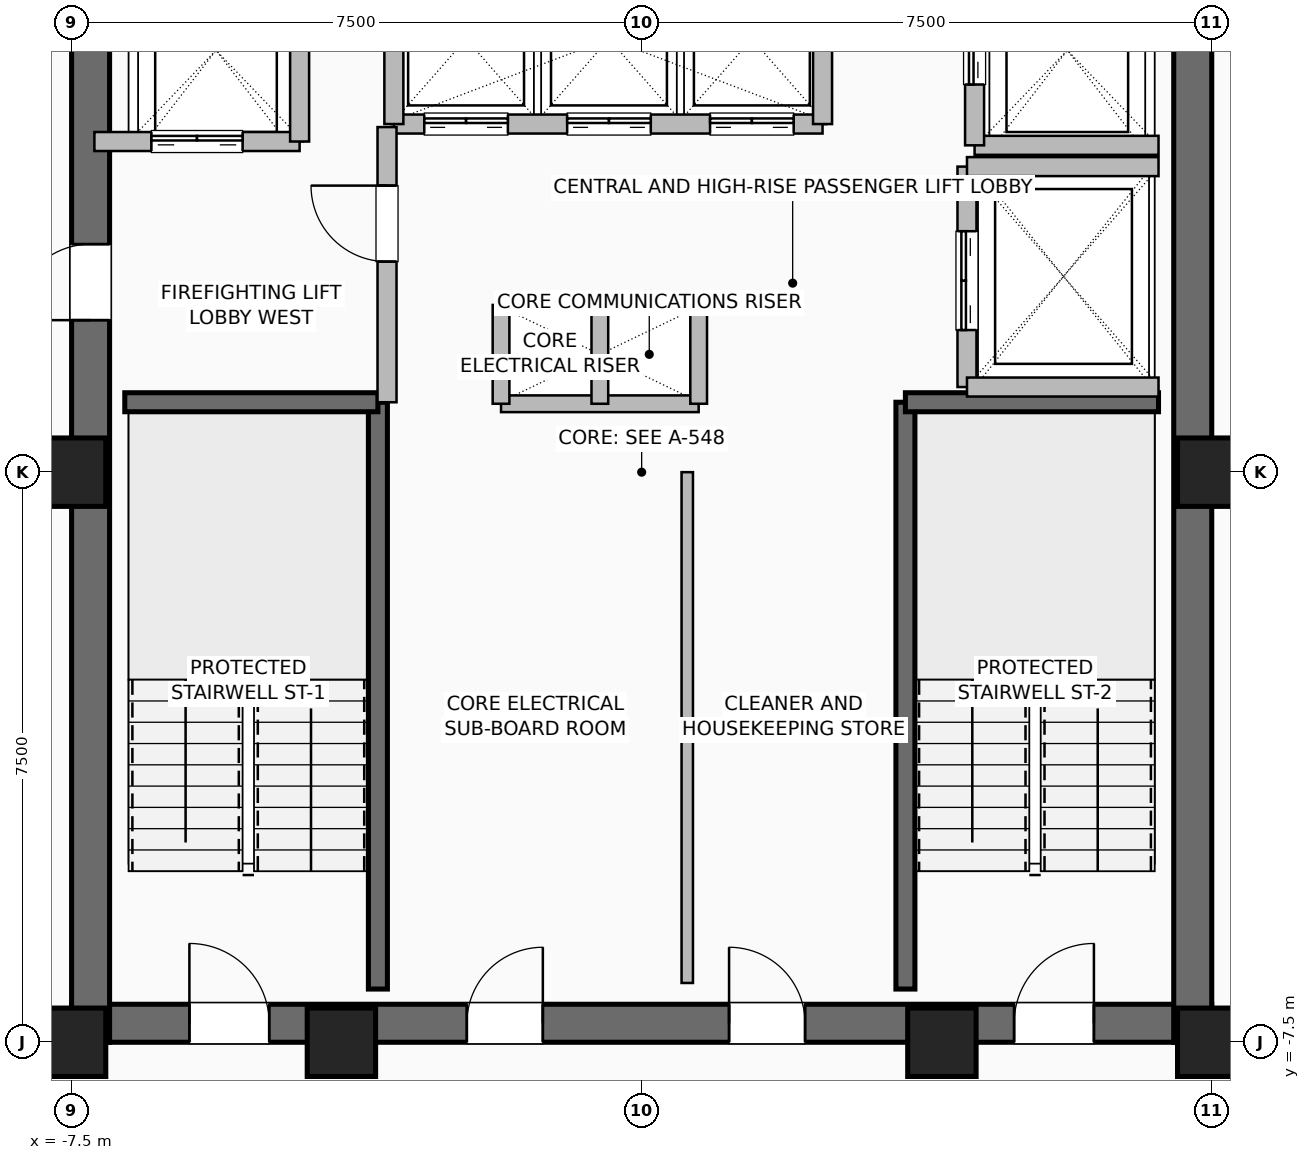
"""IFC4 building model, lengths in metres.
Left out: names, types, materials, properties, quantities, classifications, styles, units other than length and angle.
Written with IfcOpenShell. Run it as: python <this file> out.ifc"""

import sys

from ifc_helpers import new_model, si_unit, direction, frame, frame_2d, origin, origin_2d, place, context, subcontext, project, spatial, rectangle, hollow_rectangle, extrude, element, fill, save


model = new_model("IFC4")
c1 = context("Model", 3, precision=1e-05, world=origin(), true_north=direction((0.0, 1.0)))
c2 = subcontext(c1, "Body", "Model", "MODEL_VIEW")
j1 = project(units=[si_unit("LENGTHUNIT", "METRE"), si_unit("PLANEANGLEUNIT", "RADIAN")], contexts=[c1])
p1 = place(None, origin())
s1 = spatial("IfcSite", under=j1, at=p1, CompositionType="ELEMENT")
p2 = place(p1, origin())
s2 = spatial("IfcBuilding", under=s1, at=p2, CompositionType="ELEMENT")
p3 = place(p2, frame((0.0, 0.0, 187.8)))
s3 = spatial("IfcBuildingStorey", under=s2, at=p3, CompositionType="ELEMENT", Elevation=187.8)
for number, where, z_axis, x_axis in (
    (1, (-7.5, -7.5, 0.0), (0.0, 0.0, 1.0), (1.0, 0.0, 0.0)),
    (2, (-3.95, -7.5, 0.0), (0.0, 0.0, 1.0), (1.0, 0.0, 0.0)),
    (3, (3.95, -7.5, 0.0), (0.0, 0.0, 1.0), (1.0, 0.0, 0.0)),
    (4, (7.5, -7.5, 0.0), (0.0, 0.0, 1.0), (1.0, 0.0, 0.0)),
    (5, (7.5, 0.0, 0.0), (0.0, 0.0, 1.0), (1.0, 0.0, 0.0)),
    (6, (-7.5, 0.0, 0.0), (0.0, 0.0, 1.0), (1.0, 0.0, 0.0)),
):
    element("IfcColumn", number, at=place(p3, frame(where, z_axis=z_axis, x_axis=x_axis)), inside=s3, PredefinedType="COLUMN", context=c2, shape_type="SweptSolid", body=[
        extrude(hollow_rectangle(XDim=0.9, YDim=0.9, WallThickness=0.045, at=origin_2d()), origin(), (0.0, 0.0, 1.0), 3.6),
    ])
p4 = place(p3, frame((-7.5, -7.25, 0.0), z_axis=(0.0, 0.0, 1.0), x_axis=(1.0, 0.0, 0.0)))
e7 = element("IfcWall", 7, at=p4, inside=s3, PredefinedType="SHEAR", context=c2, shape_type="SweptSolid", body=[
    extrude(rectangle(XDim=15.0, YDim=0.5, at=frame_2d((7.5, 0.0))), origin(), (0.0, 0.0, 1.0), 3.36),
])
p5 = place(p4, frame((1.55, 0.0, 0.0)))
e8 = element("IfcOpeningElement", 8, at=p5, cuts=e7, PredefinedType="OPENING", context=c2, shape_type="SweptSolid", body=[
    extrude(rectangle(XDim=1.05, YDim=2.08, at=frame_2d((0.525, 1.04))), frame((0.0, 0.26, 0.0), z_axis=(0.0, -1.0, 0.0), x_axis=(1.0, 0.0, 0.0)), (0.0, 0.0, 1.0), 0.52),
])
p6 = place(p4, frame((12.4, 0.0, 0.0)))
e9 = element("IfcOpeningElement", 9, at=p6, cuts=e7, PredefinedType="OPENING", context=c2, shape_type="SweptSolid", body=[
    extrude(rectangle(XDim=1.05, YDim=2.08, at=frame_2d((0.525, 1.04))), frame((0.0, 0.26, 0.0), z_axis=(0.0, -1.0, 0.0), x_axis=(1.0, 0.0, 0.0)), (0.0, 0.0, 1.0), 0.52),
])
p7 = place(p4, frame((5.2, 0.0, 0.0)))
e10 = element("IfcOpeningElement", 10, at=p7, cuts=e7, PredefinedType="OPENING", context=c2, shape_type="SweptSolid", body=[
    extrude(rectangle(XDim=1.0, YDim=2.08, at=frame_2d((0.5, 1.04))), frame((0.0, 0.26, 0.0), z_axis=(0.0, -1.0, 0.0), x_axis=(1.0, 0.0, 0.0)), (0.0, 0.0, 1.0), 0.52),
])
p8 = place(p4, frame((8.65, 0.0, 0.0)))
e11 = element("IfcOpeningElement", 11, at=p8, cuts=e7, PredefinedType="OPENING", context=c2, shape_type="SweptSolid", body=[
    extrude(rectangle(XDim=1.0, YDim=2.08, at=frame_2d((0.5, 1.04))), frame((0.0, 0.26, 0.0), z_axis=(0.0, -1.0, 0.0), x_axis=(1.0, 0.0, 0.0)), (0.0, 0.0, 1.0), 0.52),
])
p9 = place(p3, frame((-7.25, -7.5, 0.0), z_axis=(0.0, 0.0, 1.0), x_axis=(0.0, 1.0, 0.0)))
e12 = element("IfcWall", 12, at=p9, inside=s3, PredefinedType="SHEAR", context=c2, shape_type="SweptSolid", body=[
    extrude(rectangle(XDim=15.0, YDim=0.5, at=frame_2d((7.5, 0.0))), origin(), (0.0, 0.0, 1.0), 3.36),
])
p10 = place(p9, frame((9.5, 0.0, 0.0)))
e13 = element("IfcOpeningElement", 13, at=p10, cuts=e12, PredefinedType="OPENING", context=c2, shape_type="SweptSolid", body=[
    extrude(rectangle(XDim=1.0, YDim=2.08, at=frame_2d((0.5, 1.04))), frame((0.0, 0.26, 0.0), z_axis=(0.0, -1.0, 0.0), x_axis=(1.0, 0.0, 0.0)), (0.0, 0.0, 1.0), 0.52),
])
p11 = place(p3, frame((7.25, -7.5, 0.0), z_axis=(0.0, 0.0, 1.0), x_axis=(0.0, 1.0, 0.0)))
e14 = element("IfcWall", 14, at=p11, inside=s3, PredefinedType="SHEAR", context=c2, shape_type="SweptSolid", body=[
    extrude(rectangle(XDim=15.0, YDim=0.5, at=frame_2d((7.5, 0.0))), origin(), (0.0, 0.0, 1.0), 3.36),
])
p12 = place(p3, frame((-3.47, -6.8, 0.0), z_axis=(0.0, 0.0, 1.0), x_axis=(0.0, 1.0, 0.0)))
e15 = element("IfcWall", 15, at=p12, inside=s3, PredefinedType="SHEAR", context=c2, shape_type="SweptSolid", body=[
    extrude(rectangle(XDim=7.72, YDim=0.25, at=frame_2d((3.86, 0.0))), origin(), (0.0, 0.0, 1.0), 3.36),
])
p13 = place(p3, frame((-6.8, 0.92, 0.0), z_axis=(0.0, 0.0, 1.0), x_axis=(1.0, 0.0, 0.0)))
e16 = element("IfcWall", 16, at=p13, inside=s3, PredefinedType="SHEAR", context=c2, shape_type="SweptSolid", body=[
    extrude(rectangle(XDim=3.33, YDim=0.25, at=frame_2d((1.665, 0.0))), origin(), (0.0, 0.0, 1.0), 3.36),
])
p14 = place(p3, frame((3.47, -6.8, 0.0), z_axis=(0.0, 0.0, 1.0), x_axis=(0.0, 1.0, 0.0)))
e17 = element("IfcWall", 17, at=p14, inside=s3, PredefinedType="SHEAR", context=c2, shape_type="SweptSolid", body=[
    extrude(rectangle(XDim=7.72, YDim=0.25, at=frame_2d((3.86, 0.0))), origin(), (0.0, 0.0, 1.0), 3.36),
])
p15 = place(p3, frame((3.47, 0.92, 0.0), z_axis=(0.0, 0.0, 1.0), x_axis=(1.0, 0.0, 0.0)))
e18 = element("IfcWall", 18, at=p15, inside=s3, PredefinedType="SHEAR", context=c2, shape_type="SweptSolid", body=[
    extrude(rectangle(XDim=3.33, YDim=0.25, at=frame_2d((1.665, 0.0))), origin(), (0.0, 0.0, 1.0), 3.36),
])
for number, where, z_axis, x_axis in (
    (19, (-1.85, 2.2, 0.0), (0.0, 0.0, 1.0), (1.0, 0.0, 0.0)),
    (20, (-1.85, 0.9, 0.0), (0.0, 0.0, 1.0), (1.0, 0.0, 0.0)),
):
    element("IfcWall", number, at=place(p3, frame(where, z_axis=z_axis, x_axis=x_axis)), inside=s3, PredefinedType="PARTITIONING", context=c2, shape_type="SweptSolid", body=[
        extrude(rectangle(XDim=2.6, YDim=0.22, at=frame_2d((1.3, 0.0))), origin(), (0.0, 0.0, 1.0), 3.36),
    ])
for number, where, z_axis, x_axis in (
    (21, (-0.55, 0.9, 0.0), (0.0, 0.0, 1.0), (0.0, 1.0, 0.0)),
    (22, (0.75, 0.9, 0.0), (0.0, 0.0, 1.0), (0.0, 1.0, 0.0)),
    (23, (-1.85, 0.9, 0.0), (0.0, 0.0, 1.0), (0.0, 1.0, 0.0)),
):
    element("IfcWall", number, at=place(p3, frame(where, z_axis=z_axis, x_axis=x_axis)), inside=s3, PredefinedType="PARTITIONING", context=c2, shape_type="SweptSolid", body=[
        extrude(rectangle(XDim=1.3, YDim=0.22, at=frame_2d((0.65, 0.0))), origin(), (0.0, 0.0, 1.0), 3.36),
    ])
p16 = place(p3, frame((-3.26, 4.58, 0.0), z_axis=(0.0, 0.0, 1.0), x_axis=(1.0, 0.0, 0.0)))
e24 = element("IfcWall", 24, at=p16, inside=s3, PredefinedType="SHEAR", context=c2, shape_type="SweptSolid", body=[
    extrude(rectangle(XDim=5.64, YDim=0.25, at=frame_2d((2.82, 0.0))), origin(), (0.0, 0.0, 1.0), 3.36),
])
p17 = place(p16, frame((0.4, 0.0, 0.0)))
e25 = element("IfcOpeningElement", 25, at=p17, cuts=e24, PredefinedType="OPENING", context=c2, shape_type="SweptSolid", body=[
    extrude(rectangle(XDim=1.1, YDim=2.2, at=frame_2d((0.55, 1.1))), frame((0.0, 0.135, 0.0), z_axis=(0.0, -1.0, 0.0), x_axis=(1.0, 0.0, 0.0)), (0.0, 0.0, 1.0), 0.27),
])
p18 = place(p16, frame((2.28, 0.0, 0.0)))
e26 = element("IfcOpeningElement", 26, at=p18, cuts=e24, PredefinedType="OPENING", context=c2, shape_type="SweptSolid", body=[
    extrude(rectangle(XDim=1.1, YDim=2.2, at=frame_2d((0.55, 1.1))), frame((0.0, 0.135, 0.0), z_axis=(0.0, -1.0, 0.0), x_axis=(1.0, 0.0, 0.0)), (0.0, 0.0, 1.0), 0.27),
])
p19 = place(p16, frame((4.16, 0.0, 0.0)))
e27 = element("IfcOpeningElement", 27, at=p19, cuts=e24, PredefinedType="OPENING", context=c2, shape_type="SweptSolid", body=[
    extrude(rectangle(XDim=1.1, YDim=2.2, at=frame_2d((0.55, 1.1))), frame((0.0, 0.135, 0.0), z_axis=(0.0, -1.0, 0.0), x_axis=(1.0, 0.0, 0.0)), (0.0, 0.0, 1.0), 0.27),
])
for number, where, z_axis, x_axis in (
    (28, (-3.26, 4.58, 0.0), (0.0, 0.0, 1.0), (0.0, 1.0, 0.0)),
    (29, (2.38, 4.58, 0.0), (0.0, 0.0, 1.0), (0.0, 1.0, 0.0)),
):
    element("IfcWall", number, at=place(p3, frame(where, z_axis=z_axis, x_axis=x_axis)), inside=s3, PredefinedType="SHEAR", context=c2, shape_type="SweptSolid", body=[
        extrude(rectangle(XDim=2.22, YDim=0.25, at=frame_2d((1.11, 0.0))), origin(), (0.0, 0.0, 1.0), 3.36),
    ])
p20 = place(p3, frame((-7.2, 4.35, 0.0), z_axis=(0.0, 0.0, 1.0), x_axis=(1.0, 0.0, 0.0)))
e30 = element("IfcWall", 30, at=p20, inside=s3, PredefinedType="SHEAR", context=c2, shape_type="SweptSolid", body=[
    extrude(rectangle(XDim=2.7, YDim=0.25, at=frame_2d((1.35, 0.0))), origin(), (0.0, 0.0, 1.0), 3.36),
])
p21 = place(p20, frame((0.75, 0.0, 0.0)))
e31 = element("IfcOpeningElement", 31, at=p21, cuts=e30, PredefinedType="OPENING", context=c2, shape_type="SweptSolid", body=[
    extrude(rectangle(XDim=1.2, YDim=2.2, at=frame_2d((0.6, 1.1))), frame((0.0, 0.135, 0.0), z_axis=(0.0, -1.0, 0.0), x_axis=(1.0, 0.0, 0.0)), (0.0, 0.0, 1.0), 0.27),
])
p22 = place(p3, frame((-4.5, 4.35, 0.0), z_axis=(0.0, 0.0, 1.0), x_axis=(0.0, 1.0, 0.0)))
e32 = element("IfcWall", 32, at=p22, inside=s3, PredefinedType="SHEAR", context=c2, shape_type="SweptSolid", body=[
    extrude(rectangle(XDim=2.85, YDim=0.25, at=frame_2d((1.425, 0.0))), origin(), (0.0, 0.0, 1.0), 3.36),
])
p23 = place(p3, frame((4.38, 4.3, 0.0), z_axis=(0.0, 0.0, 1.0), x_axis=(1.0, 0.0, 0.0)))
e33 = element("IfcWall", 33, at=p23, inside=s3, PredefinedType="SHEAR", context=c2, shape_type="SweptSolid", body=[
    extrude(rectangle(XDim=2.42, YDim=0.25, at=frame_2d((1.21, 0.0))), origin(), (0.0, 0.0, 1.0), 3.36),
])
p24 = place(p3, frame((4.38, 4.3, 0.0), z_axis=(0.0, 0.0, 1.0), x_axis=(0.0, 1.0, 0.0)))
e34 = element("IfcWall", 34, at=p24, inside=s3, PredefinedType="SHEAR", context=c2, shape_type="SweptSolid", body=[
    extrude(rectangle(XDim=2.5, YDim=0.25, at=frame_2d((1.25, 0.0))), origin(), (0.0, 0.0, 1.0), 3.36),
])
p25 = place(p24, frame((0.8, 0.0, 0.0)))
e35 = element("IfcOpeningElement", 35, at=p25, cuts=e34, PredefinedType="OPENING", context=c2, shape_type="SweptSolid", body=[
    extrude(rectangle(XDim=1.2, YDim=2.2, at=frame_2d((0.6, 1.1))), frame((0.0, 0.135, 0.0), z_axis=(0.0, -1.0, 0.0), x_axis=(1.0, 0.0, 0.0)), (0.0, 0.0, 1.0), 0.27),
])
p26 = place(p3, frame((4.28, 1.12, 0.0), z_axis=(0.0, 0.0, 1.0), x_axis=(0.0, 1.0, 0.0)))
e36 = element("IfcWall", 36, at=p26, inside=s3, PredefinedType="SHEAR", context=c2, shape_type="SweptSolid", body=[
    extrude(rectangle(XDim=2.9, YDim=0.25, at=frame_2d((1.45, 0.0))), origin(), (0.0, 0.0, 1.0), 3.36),
])
p27 = place(p26, frame((0.75, 0.0, 0.0)))
e37 = element("IfcOpeningElement", 37, at=p27, cuts=e36, PredefinedType="OPENING", context=c2, shape_type="SweptSolid", body=[
    extrude(rectangle(XDim=1.3, YDim=2.3, at=frame_2d((0.65, 1.15))), frame((0.0, 0.135, 0.0), z_axis=(0.0, -1.0, 0.0), x_axis=(1.0, 0.0, 0.0)), (0.0, 0.0, 1.0), 0.27),
])
for number, where, z_axis, x_axis in (
    (38, (4.28, 1.12, 0.0), (0.0, 0.0, 1.0), (1.0, 0.0, 0.0)),
    (39, (4.28, 4.02, 0.0), (0.0, 0.0, 1.0), (1.0, 0.0, 0.0)),
):
    element("IfcWall", number, at=place(p3, frame(where, z_axis=z_axis, x_axis=x_axis)), inside=s3, PredefinedType="SHEAR", context=c2, shape_type="SweptSolid", body=[
        extrude(rectangle(XDim=2.52, YDim=0.25, at=frame_2d((1.26, 0.0))), origin(), (0.0, 0.0, 1.0), 3.36),
    ])
p28 = place(p3, frame((-3.35, 0.92, 0.0), z_axis=(0.0, 0.0, 1.0), x_axis=(0.0, 1.0, 0.0)))
e40 = element("IfcWall", 40, at=p28, inside=s3, PredefinedType="SHEAR", context=c2, shape_type="SweptSolid", body=[
    extrude(rectangle(XDim=3.62, YDim=0.25, at=frame_2d((1.81, 0.0))), origin(), (0.0, 0.0, 1.0), 3.36),
])
p29 = place(p28, frame((1.85, 0.0, 0.0)))
e41 = element("IfcOpeningElement", 41, at=p29, cuts=e40, PredefinedType="OPENING", context=c2, shape_type="SweptSolid", body=[
    extrude(rectangle(XDim=1.0, YDim=2.08, at=frame_2d((0.5, 1.04))), frame((0.0, 0.135, 0.0), z_axis=(0.0, -1.0, 0.0), x_axis=(1.0, 0.0, 0.0)), (0.0, 0.0, 1.0), 0.27),
])
p30 = place(p3, frame((0.6, -6.72, 0.0), z_axis=(0.0, 0.0, 1.0), x_axis=(0.0, 1.0, 0.0)))
e42 = element("IfcWall", 42, at=p30, inside=s3, PredefinedType="PARTITIONING", context=c2, shape_type="SweptSolid", body=[
    extrude(rectangle(XDim=6.72, YDim=0.15, at=frame_2d((3.36, 0.0))), origin(), (0.0, 0.0, 1.0), 3.36),
])
p31 = place(p3, frame((7.45, -7.48, 0.0), z_axis=(0.0, 0.0, 1.0), x_axis=(1.0, 0.0, 0.0)))
e43 = element("IfcWall", 43, at=p31, inside=s3, PredefinedType="PARTITIONING", context=c2, shape_type="SweptSolid", body=[
    extrude(rectangle(XDim=0.95, YDim=0.15, at=frame_2d((0.475, 0.0))), origin(), (0.0, 0.0, 1.0), 3.36),
])
p32 = place(p5, origin())
e44 = element("IfcDoor", 44, at=p32, inside=s3, OperationType="SINGLE_SWING_LEFT", PredefinedType="DOOR", context=c2, shape_type="SweptSolid", body=[
    extrude(rectangle(XDim=1.05, YDim=2.08, at=frame_2d((0.525, 1.04))), frame((0.0, 0.025, 0.0), z_axis=(0.0, -1.0, 0.0), x_axis=(1.0, 0.0, 0.0)), (0.0, 0.0, 1.0), 0.05),
])
fill(e8, e44)
p33 = place(p6, origin())
e45 = element("IfcDoor", 45, at=p33, inside=s3, OperationType="SINGLE_SWING_RIGHT", PredefinedType="DOOR", context=c2, shape_type="SweptSolid", body=[
    extrude(rectangle(XDim=1.05, YDim=2.08, at=frame_2d((0.525, 1.04))), frame((0.0, 0.025, 0.0), z_axis=(0.0, -1.0, 0.0), x_axis=(1.0, 0.0, 0.0)), (0.0, 0.0, 1.0), 0.05),
])
fill(e9, e45)
p34 = place(p10, origin())
e46 = element("IfcDoor", 46, at=p34, inside=s3, OperationType="SINGLE_SWING_LEFT", PredefinedType="DOOR", context=c2, shape_type="SweptSolid", body=[
    extrude(rectangle(XDim=1.0, YDim=2.08, at=frame_2d((0.5, 1.04))), frame((0.0, 0.025, 0.0), z_axis=(0.0, -1.0, 0.0), x_axis=(1.0, 0.0, 0.0)), (0.0, 0.0, 1.0), 0.05),
])
fill(e13, e46)
p35 = place(p7, origin())
e47 = element("IfcDoor", 47, at=p35, inside=s3, OperationType="SINGLE_SWING_RIGHT", PredefinedType="DOOR", context=c2, shape_type="SweptSolid", body=[
    extrude(rectangle(XDim=1.0, YDim=2.08, at=frame_2d((0.5, 1.04))), frame((0.0, 0.025, 0.0), z_axis=(0.0, -1.0, 0.0), x_axis=(1.0, 0.0, 0.0)), (0.0, 0.0, 1.0), 0.05),
])
fill(e10, e47)
p36 = place(p8, origin())
e48 = element("IfcDoor", 48, at=p36, inside=s3, OperationType="SINGLE_SWING_LEFT", PredefinedType="DOOR", context=c2, shape_type="SweptSolid", body=[
    extrude(rectangle(XDim=1.0, YDim=2.08, at=frame_2d((0.5, 1.04))), frame((0.0, 0.025, 0.0), z_axis=(0.0, -1.0, 0.0), x_axis=(1.0, 0.0, 0.0)), (0.0, 0.0, 1.0), 0.05),
])
fill(e11, e48)
p37 = place(p17, origin())
e49 = element("IfcDoor", 49, at=p37, inside=s3, OperationType="DOUBLE_DOOR_SLIDING", PredefinedType="DOOR", context=c2, shape_type="SweptSolid", body=[
    extrude(rectangle(XDim=1.1, YDim=2.2, at=frame_2d((0.55, 1.1))), frame((0.0, 0.025, 0.0), z_axis=(0.0, -1.0, 0.0), x_axis=(1.0, 0.0, 0.0)), (0.0, 0.0, 1.0), 0.05),
])
fill(e25, e49)
p38 = place(p18, origin())
e50 = element("IfcDoor", 50, at=p38, inside=s3, OperationType="DOUBLE_DOOR_SLIDING", PredefinedType="DOOR", context=c2, shape_type="SweptSolid", body=[
    extrude(rectangle(XDim=1.1, YDim=2.2, at=frame_2d((0.55, 1.1))), frame((0.0, 0.025, 0.0), z_axis=(0.0, -1.0, 0.0), x_axis=(1.0, 0.0, 0.0)), (0.0, 0.0, 1.0), 0.05),
])
fill(e26, e50)
p39 = place(p19, origin())
e51 = element("IfcDoor", 51, at=p39, inside=s3, OperationType="DOUBLE_DOOR_SLIDING", PredefinedType="DOOR", context=c2, shape_type="SweptSolid", body=[
    extrude(rectangle(XDim=1.1, YDim=2.2, at=frame_2d((0.55, 1.1))), frame((0.0, 0.025, 0.0), z_axis=(0.0, -1.0, 0.0), x_axis=(1.0, 0.0, 0.0)), (0.0, 0.0, 1.0), 0.05),
])
fill(e27, e51)
p40 = place(p21, origin())
e52 = element("IfcDoor", 52, at=p40, inside=s3, OperationType="DOUBLE_DOOR_SLIDING", PredefinedType="DOOR", context=c2, shape_type="SweptSolid", body=[
    extrude(rectangle(XDim=1.2, YDim=2.2, at=frame_2d((0.6, 1.1))), frame((0.0, 0.025, 0.0), z_axis=(0.0, -1.0, 0.0), x_axis=(1.0, 0.0, 0.0)), (0.0, 0.0, 1.0), 0.05),
])
fill(e31, e52)
p41 = place(p25, origin())
e53 = element("IfcDoor", 53, at=p41, inside=s3, OperationType="DOUBLE_DOOR_SLIDING", PredefinedType="DOOR", context=c2, shape_type="SweptSolid", body=[
    extrude(rectangle(XDim=1.2, YDim=2.2, at=frame_2d((0.6, 1.1))), frame((0.0, 0.025, 0.0), z_axis=(0.0, -1.0, 0.0), x_axis=(1.0, 0.0, 0.0)), (0.0, 0.0, 1.0), 0.05),
])
fill(e35, e53)
p42 = place(p27, origin())
e54 = element("IfcDoor", 54, at=p42, inside=s3, OperationType="DOUBLE_DOOR_SLIDING", PredefinedType="DOOR", context=c2, shape_type="SweptSolid", body=[
    extrude(rectangle(XDim=1.3, YDim=2.3, at=frame_2d((0.65, 1.15))), frame((0.0, 0.025, 0.0), z_axis=(0.0, -1.0, 0.0), x_axis=(1.0, 0.0, 0.0)), (0.0, 0.0, 1.0), 0.05),
])
fill(e37, e54)
p43 = place(p29, origin())
e55 = element("IfcDoor", 55, at=p43, inside=s3, OperationType="SINGLE_SWING_RIGHT", PredefinedType="DOOR", context=c2, shape_type="SweptSolid", body=[
    extrude(rectangle(XDim=1.0, YDim=2.08, at=frame_2d((0.5, 1.04))), frame((0.0, 0.025, 0.0), z_axis=(0.0, -1.0, 0.0), x_axis=(1.0, 0.0, 0.0)), (0.0, 0.0, 1.0), 0.05),
])
fill(e41, e55)
save(model, sys.argv[1])
